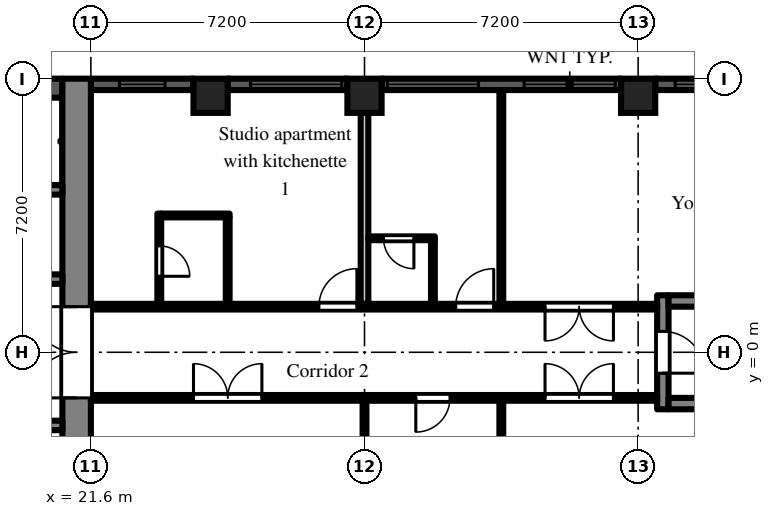
"""IFC4 building model, lengths in metres.
Left out: names, types, materials, properties, quantities, classifications, styles, units other than length and angle.
Written with IfcOpenShell. Run it as: python <this file> out.ifc"""

import sys

from ifc_helpers import new_model, si_unit, direction, frame, frame_2d, origin, origin_2d, place, context, subcontext, project, spatial, rectangle, extrude, element, fill, save


model = new_model("IFC4")
c1 = context("Model", 3, precision=1e-05, world=origin(), true_north=direction((0.0, 1.0)))
c2 = subcontext(c1, "Body", "Model", "MODEL_VIEW")
j1 = project(units=[si_unit("LENGTHUNIT", "METRE"), si_unit("PLANEANGLEUNIT", "RADIAN")], contexts=[c1])
p1 = place(None, origin())
s1 = spatial("IfcSite", under=j1, at=p1, CompositionType="ELEMENT")
p2 = place(p1, origin())
s2 = spatial("IfcBuilding", under=s1, at=p2, CompositionType="ELEMENT")
p3 = place(p2, frame((0.0, 0.0, 84.9)))
s3 = spatial("IfcBuildingStorey", under=s2, at=p3, CompositionType="ELEMENT", Elevation=84.9)
for number, where, z_axis, x_axis in (
    (1, (24.75, 6.75, 0.0), (0.0, 0.0, 1.0), (1.0, 0.0, 0.0)),
    (2, (28.8, 6.75, 0.0), (0.0, 0.0, 1.0), (1.0, 0.0, 0.0)),
    (3, (36.0, 6.75, 0.0), (0.0, 0.0, 1.0), (1.0, 0.0, 0.0)),
):
    element("IfcColumn", number, at=place(p3, frame(where, z_axis=z_axis, x_axis=x_axis)), inside=s3, PredefinedType="COLUMN", context=c2, shape_type="SweptSolid", body=[
        extrude(rectangle(XDim=0.9, YDim=0.9, at=origin_2d()), origin(), (0.0, 0.0, 1.0), 3.0),
    ])
p4 = place(p3, frame((38.7, 7.05, 0.0), z_axis=(0.0, 0.0, 1.0), x_axis=(-1.0, 0.0, 0.0)))
e4 = element("IfcWall", 4, at=p4, inside=s3, PredefinedType="SOLIDWALL", context=c2, shape_type="SweptSolid", body=[
    extrude(rectangle(XDim=2.25, YDim=0.3, at=frame_2d((1.125, 0.0))), origin(), (0.0, 0.0, 1.0), 2.1),
])
p5 = place(p4, frame((0.525, 0.0, 0.2)))
e5 = element("IfcOpeningElement", 5, at=p5, cuts=e4, PredefinedType="OPENING", context=c2, shape_type="SweptSolid", body=[
    extrude(rectangle(XDim=1.2, YDim=1.85, at=frame_2d((0.6, 0.925))), frame((0.0, 0.16, 0.0), z_axis=(0.0, -1.0, 0.0), x_axis=(1.0, 0.0, 0.0)), (0.0, 0.0, 1.0), 0.32),
])
p6 = place(p3, frame((35.55, 7.05, 0.0), z_axis=(0.0, 0.0, 1.0), x_axis=(-1.0, 0.0, 0.0)))
e6 = element("IfcWall", 6, at=p6, inside=s3, PredefinedType="SOLIDWALL", context=c2, shape_type="SweptSolid", body=[
    extrude(rectangle(XDim=6.3, YDim=0.3, at=frame_2d((3.15, 0.0))), origin(), (0.0, 0.0, 1.0), 2.1),
])
p7 = place(p6, frame((0.15, 0.0, 0.2)))
e7 = element("IfcOpeningElement", 7, at=p7, cuts=e6, PredefinedType="OPENING", context=c2, shape_type="SweptSolid", body=[
    extrude(rectangle(XDim=2.4, YDim=1.85, at=frame_2d((1.2, 0.925))), frame((0.0, 0.16, 0.0), z_axis=(0.0, -1.0, 0.0), x_axis=(1.0, 0.0, 0.0)), (0.0, 0.0, 1.0), 0.32),
])
p8 = place(p6, frame((3.75, 0.0, 0.2)))
e8 = element("IfcOpeningElement", 8, at=p8, cuts=e6, PredefinedType="OPENING", context=c2, shape_type="SweptSolid", body=[
    extrude(rectangle(XDim=2.4, YDim=1.85, at=frame_2d((1.2, 0.925))), frame((0.0, 0.16, 0.0), z_axis=(0.0, -1.0, 0.0), x_axis=(1.0, 0.0, 0.0)), (0.0, 0.0, 1.0), 0.32),
])
p9 = place(p3, frame((28.35, 7.05, 0.0), z_axis=(0.0, 0.0, 1.0), x_axis=(-1.0, 0.0, 0.0)))
e9 = element("IfcWall", 9, at=p9, inside=s3, PredefinedType="SOLIDWALL", context=c2, shape_type="SweptSolid", body=[
    extrude(rectangle(XDim=3.15, YDim=0.3, at=frame_2d((1.575, 0.0))), origin(), (0.0, 0.0, 1.0), 2.1),
])
p10 = place(p9, frame((0.15, 0.0, 0.2)))
e10 = element("IfcOpeningElement", 10, at=p10, cuts=e9, PredefinedType="OPENING", context=c2, shape_type="SweptSolid", body=[
    extrude(rectangle(XDim=2.4, YDim=1.85, at=frame_2d((1.2, 0.925))), frame((0.0, 0.16, 0.0), z_axis=(0.0, -1.0, 0.0), x_axis=(1.0, 0.0, 0.0)), (0.0, 0.0, 1.0), 0.32),
])
p11 = place(p3, frame((24.3, 7.05, 0.0), z_axis=(0.0, 0.0, 1.0), x_axis=(-1.0, 0.0, 0.0)))
e11 = element("IfcWall", 11, at=p11, inside=s3, PredefinedType="SOLIDWALL", context=c2, shape_type="SweptSolid", body=[
    extrude(rectangle(XDim=2.7, YDim=0.3, at=frame_2d((1.35, 0.0))), origin(), (0.0, 0.0, 1.0), 2.1),
])
p12 = place(p11, frame((0.75, 0.0, 0.2)))
e12 = element("IfcOpeningElement", 12, at=p12, cuts=e11, PredefinedType="OPENING", context=c2, shape_type="SweptSolid", body=[
    extrude(rectangle(XDim=1.2, YDim=1.85, at=frame_2d((0.6, 0.925))), frame((0.0, 0.16, 0.0), z_axis=(0.0, -1.0, 0.0), x_axis=(1.0, 0.0, 0.0)), (0.0, 0.0, 1.0), 0.32),
])
p13 = place(p3, frame((21.225, -7.2, 0.0), z_axis=(0.0, 0.0, 1.0), x_axis=(0.0, 1.0, 0.0)))
e13 = element("IfcWall", 13, at=p13, inside=s3, PredefinedType="SHEAR", context=c2, shape_type="SweptSolid", body=[
    extrude(rectangle(XDim=14.4, YDim=0.75, at=frame_2d((7.2, 0.0))), origin(), (0.0, 0.0, 1.0), 2.575),
])
p14 = place(p13, frame((6.0, 0.0, 0.0)))
e14 = element("IfcOpeningElement", 14, at=p14, cuts=e13, PredefinedType="OPENING", context=c2, shape_type="SweptSolid", body=[
    extrude(rectangle(XDim=2.4, YDim=2.2, at=frame_2d((1.2, 1.1))), frame((0.0, 0.385, 0.0), z_axis=(0.0, -1.0, 0.0), x_axis=(1.0, 0.0, 0.0)), (0.0, 0.0, 1.0), 0.77),
])
p15 = place(p3, frame((7.9, 6.95, 0.0), z_axis=(0.0, 0.0, 1.0), x_axis=(1.0, 0.0, 0.0)))
e15 = element("IfcWall", 15, at=p15, inside=s3, PredefinedType="SHEAR", context=c2, shape_type="SweptSolid", body=[
    extrude(rectangle(XDim=12.95, YDim=0.5, at=frame_2d((6.475, 0.0))), origin(), (0.0, 0.0, 1.0), 2.575),
])
p16 = place(p3, frame((7.9, 1.925, 0.0), z_axis=(0.0, 0.0, 1.0), x_axis=(1.0, 0.0, 0.0)))
e16 = element("IfcWall", 16, at=p16, inside=s3, PredefinedType="SHEAR", context=c2, shape_type="SweptSolid", body=[
    extrude(rectangle(XDim=12.95, YDim=0.25, at=frame_2d((6.475, 0.0))), origin(), (0.0, 0.0, 1.0), 2.575),
])
p17 = place(p16, frame((0.525, 0.0, 0.0)))
e17 = element("IfcOpeningElement", 17, at=p17, cuts=e16, PredefinedType="OPENING", context=c2, shape_type="SweptSolid", body=[
    extrude(rectangle(XDim=0.9, YDim=2.1, at=frame_2d((0.45, 1.05))), frame((0.0, 0.135, 0.0), z_axis=(0.0, -1.0, 0.0), x_axis=(1.0, 0.0, 0.0)), (0.0, 0.0, 1.0), 0.27),
])
p18 = place(p16, frame((2.625, 0.0, 0.0)))
e18 = element("IfcOpeningElement", 18, at=p18, cuts=e16, PredefinedType="OPENING", context=c2, shape_type="SweptSolid", body=[
    extrude(rectangle(XDim=1.1, YDim=2.1, at=frame_2d((0.55, 1.05))), frame((0.0, 0.135, 0.0), z_axis=(0.0, -1.0, 0.0), x_axis=(1.0, 0.0, 0.0)), (0.0, 0.0, 1.0), 0.27),
])
p19 = place(p16, frame((6.025, 0.0, 0.0)))
e19 = element("IfcOpeningElement", 19, at=p19, cuts=e16, PredefinedType="OPENING", context=c2, shape_type="SweptSolid", body=[
    extrude(rectangle(XDim=0.9, YDim=2.1, at=frame_2d((0.45, 1.05))), frame((0.0, 0.135, 0.0), z_axis=(0.0, -1.0, 0.0), x_axis=(1.0, 0.0, 0.0)), (0.0, 0.0, 1.0), 0.27),
])
p20 = place(p16, frame((9.325, 0.0, 0.0)))
e20 = element("IfcOpeningElement", 20, at=p20, cuts=e16, PredefinedType="OPENING", context=c2, shape_type="SweptSolid", body=[
    extrude(rectangle(XDim=0.9, YDim=2.1, at=frame_2d((0.45, 1.05))), frame((0.0, 0.135, 0.0), z_axis=(0.0, -1.0, 0.0), x_axis=(1.0, 0.0, 0.0)), (0.0, 0.0, 1.0), 0.27),
])
p21 = place(p3, frame((12.3, 4.275, 0.0), z_axis=(0.0, 0.0, 1.0), x_axis=(1.0, 0.0, 0.0)))
e21 = element("IfcWall", 21, at=p21, inside=s3, PredefinedType="SHEAR", context=c2, shape_type="SweptSolid", body=[
    extrude(rectangle(XDim=8.55, YDim=0.25, at=frame_2d((4.275, 0.0))), origin(), (0.0, 0.0, 1.0), 2.575),
])
p22 = place(p3, frame((7.9, -1.925, 0.0), z_axis=(0.0, 0.0, 1.0), x_axis=(1.0, 0.0, 0.0)))
e22 = element("IfcWall", 22, at=p22, inside=s3, PredefinedType="SHEAR", context=c2, shape_type="SweptSolid", body=[
    extrude(rectangle(XDim=12.95, YDim=0.25, at=frame_2d((6.475, 0.0))), origin(), (0.0, 0.0, 1.0), 2.575),
])
p23 = place(p22, frame((4.825, 0.0, 0.0)))
e23 = element("IfcOpeningElement", 23, at=p23, cuts=e22, PredefinedType="OPENING", context=c2, shape_type="SweptSolid", body=[
    extrude(rectangle(XDim=1.1, YDim=2.1, at=frame_2d((0.55, 1.05))), frame((0.0, 0.135, 0.0), z_axis=(0.0, -1.0, 0.0), x_axis=(1.0, 0.0, 0.0)), (0.0, 0.0, 1.0), 0.27),
])
p24 = place(p22, frame((7.025, 0.0, 0.0)))
e24 = element("IfcOpeningElement", 24, at=p24, cuts=e22, PredefinedType="OPENING", context=c2, shape_type="SweptSolid", body=[
    extrude(rectangle(XDim=1.1, YDim=2.1, at=frame_2d((0.55, 1.05))), frame((0.0, 0.135, 0.0), z_axis=(0.0, -1.0, 0.0), x_axis=(1.0, 0.0, 0.0)), (0.0, 0.0, 1.0), 0.27),
])
p25 = place(p22, frame((9.225, 0.0, 0.0)))
e25 = element("IfcOpeningElement", 25, at=p25, cuts=e22, PredefinedType="OPENING", context=c2, shape_type="SweptSolid", body=[
    extrude(rectangle(XDim=1.1, YDim=2.1, at=frame_2d((0.55, 1.05))), frame((0.0, 0.135, 0.0), z_axis=(0.0, -1.0, 0.0), x_axis=(1.0, 0.0, 0.0)), (0.0, 0.0, 1.0), 0.27),
])
p26 = place(p22, frame((0.525, 0.0, 0.0)))
e26 = element("IfcOpeningElement", 26, at=p26, cuts=e22, PredefinedType="OPENING", context=c2, shape_type="SweptSolid", body=[
    extrude(rectangle(XDim=0.9, YDim=2.1, at=frame_2d((0.45, 1.05))), frame((0.0, 0.135, 0.0), z_axis=(0.0, -1.0, 0.0), x_axis=(1.0, 0.0, 0.0)), (0.0, 0.0, 1.0), 0.27),
])
p27 = place(p22, frame((2.625, 0.0, 0.0)))
e27 = element("IfcOpeningElement", 27, at=p27, cuts=e22, PredefinedType="OPENING", context=c2, shape_type="SweptSolid", body=[
    extrude(rectangle(XDim=1.1, YDim=2.1, at=frame_2d((0.55, 1.05))), frame((0.0, 0.135, 0.0), z_axis=(0.0, -1.0, 0.0), x_axis=(1.0, 0.0, 0.0)), (0.0, 0.0, 1.0), 0.27),
])
p28 = place(p3, frame((36.65, -1.5, 0.0), z_axis=(0.0, 0.0, 1.0), x_axis=(0.0, 1.0, 0.0)))
e28 = element("IfcWall", 28, at=p28, inside=s3, PredefinedType="SHEAR", context=c2, shape_type="SweptSolid", body=[
    extrude(rectangle(XDim=3.0, YDim=0.3, at=frame_2d((1.5, 0.0))), origin(), (0.0, 0.0, 1.0), 2.575),
])
p29 = place(p28, frame((0.95, 0.0, 0.0)))
e29 = element("IfcOpeningElement", 29, at=p29, cuts=e28, PredefinedType="OPENING", context=c2, shape_type="SweptSolid", body=[
    extrude(rectangle(XDim=1.1, YDim=2.1, at=frame_2d((0.55, 1.05))), frame((0.0, 0.16, 0.0), z_axis=(0.0, -1.0, 0.0), x_axis=(1.0, 0.0, 0.0)), (0.0, 0.0, 1.0), 0.32),
])
for number, where, z_axis, x_axis in (
    (30, (36.8, -1.35, 0.0), (0.0, 0.0, 1.0), (1.0, 0.0, 0.0)),
    (31, (36.8, 1.35, 0.0), (0.0, 0.0, 1.0), (1.0, 0.0, 0.0)),
):
    element("IfcWall", number, at=place(p3, frame(where, z_axis=z_axis, x_axis=x_axis)), inside=s3, PredefinedType="SHEAR", context=c2, shape_type="SweptSolid", body=[
        extrude(rectangle(XDim=5.8, YDim=0.3, at=frame_2d((2.9, 0.0))), origin(), (0.0, 0.0, 1.0), 2.575),
    ])
p30 = place(p3, frame((21.6, -1.2, 0.0), z_axis=(0.0, 0.0, 1.0), x_axis=(1.0, 0.0, 0.0)))
e32 = element("IfcWall", 32, at=p30, inside=s3, PredefinedType="PARTITIONING", context=c2, shape_type="SweptSolid", body=[
    extrude(rectangle(XDim=14.9, YDim=0.15, at=frame_2d((7.45, 0.0))), origin(), (0.0, 0.0, 1.0), 2.575),
])
p31 = place(p30, frame((2.7, 0.0, 0.0)))
e33 = element("IfcOpeningElement", 33, at=p31, cuts=e32, PredefinedType="OPENING", context=c2, shape_type="SweptSolid", body=[
    extrude(rectangle(XDim=1.8, YDim=2.1, at=frame_2d((0.9, 1.05))), frame((0.0, 0.085, 0.0), z_axis=(0.0, -1.0, 0.0), x_axis=(1.0, 0.0, 0.0)), (0.0, 0.0, 1.0), 0.17),
])
p32 = place(p30, frame((8.55, 0.0, 0.0)))
e34 = element("IfcOpeningElement", 34, at=p32, cuts=e32, PredefinedType="OPENING", context=c2, shape_type="SweptSolid", body=[
    extrude(rectangle(XDim=0.9, YDim=2.1, at=frame_2d((0.45, 1.05))), frame((0.0, 0.085, 0.0), z_axis=(0.0, -1.0, 0.0), x_axis=(1.0, 0.0, 0.0)), (0.0, 0.0, 1.0), 0.17),
])
p33 = place(p30, frame((11.95, 0.0, 0.0)))
e35 = element("IfcOpeningElement", 35, at=p33, cuts=e32, PredefinedType="OPENING", context=c2, shape_type="SweptSolid", body=[
    extrude(rectangle(XDim=1.8, YDim=2.1, at=frame_2d((0.9, 1.05))), frame((0.0, 0.085, 0.0), z_axis=(0.0, -1.0, 0.0), x_axis=(1.0, 0.0, 0.0)), (0.0, 0.0, 1.0), 0.17),
])
p34 = place(p3, frame((21.6, 1.2, 0.0), z_axis=(0.0, 0.0, 1.0), x_axis=(1.0, 0.0, 0.0)))
e36 = element("IfcWall", 36, at=p34, inside=s3, PredefinedType="PARTITIONING", context=c2, shape_type="SweptSolid", body=[
    extrude(rectangle(XDim=14.9, YDim=0.15, at=frame_2d((7.45, 0.0))), origin(), (0.0, 0.0, 1.0), 2.575),
])
p35 = place(p34, frame((6.0, 0.0, 0.0)))
e37 = element("IfcOpeningElement", 37, at=p35, cuts=e36, PredefinedType="OPENING", context=c2, shape_type="SweptSolid", body=[
    extrude(rectangle(XDim=1.0, YDim=2.1, at=frame_2d((0.5, 1.05))), frame((0.0, 0.085, 0.0), z_axis=(0.0, -1.0, 0.0), x_axis=(1.0, 0.0, 0.0)), (0.0, 0.0, 1.0), 0.17),
])
p36 = place(p34, frame((9.6, 0.0, 0.0)))
e38 = element("IfcOpeningElement", 38, at=p36, cuts=e36, PredefinedType="OPENING", context=c2, shape_type="SweptSolid", body=[
    extrude(rectangle(XDim=1.0, YDim=2.1, at=frame_2d((0.5, 1.05))), frame((0.0, 0.085, 0.0), z_axis=(0.0, -1.0, 0.0), x_axis=(1.0, 0.0, 0.0)), (0.0, 0.0, 1.0), 0.17),
])
p37 = place(p34, frame((11.95, 0.0, 0.0)))
e39 = element("IfcOpeningElement", 39, at=p37, cuts=e36, PredefinedType="OPENING", context=c2, shape_type="SweptSolid", body=[
    extrude(rectangle(XDim=1.8, YDim=2.1, at=frame_2d((0.9, 1.05))), frame((0.0, 0.085, 0.0), z_axis=(0.0, -1.0, 0.0), x_axis=(1.0, 0.0, 0.0)), (0.0, 0.0, 1.0), 0.17),
])
p38 = place(p3, frame((23.4, 1.275, 0.0), z_axis=(0.0, 0.0, 1.0), x_axis=(0.0, 1.0, 0.0)))
e40 = element("IfcWall", 40, at=p38, inside=s3, PredefinedType="PARTITIONING", context=c2, shape_type="SweptSolid", body=[
    extrude(rectangle(XDim=2.375, YDim=0.1, at=frame_2d((1.188, 0.0))), origin(), (0.0, 0.0, 1.0), 2.575),
])
p39 = place(p38, frame((0.725, 0.0, 0.0)))
e41 = element("IfcOpeningElement", 41, at=p39, cuts=e40, PredefinedType="OPENING", context=c2, shape_type="SweptSolid", body=[
    extrude(rectangle(XDim=0.8, YDim=2.1, at=frame_2d((0.4, 1.05))), frame((0.0, 0.06, 0.0), z_axis=(0.0, -1.0, 0.0), x_axis=(1.0, 0.0, 0.0)), (0.0, 0.0, 1.0), 0.12),
])
p40 = place(p3, frame((23.45, 3.6, 0.0), z_axis=(0.0, 0.0, 1.0), x_axis=(1.0, 0.0, 0.0)))
e42 = element("IfcWall", 42, at=p40, inside=s3, PredefinedType="PARTITIONING", context=c2, shape_type="SweptSolid", body=[
    extrude(rectangle(XDim=1.8, YDim=0.1, at=frame_2d((0.9, 0.0))), origin(), (0.0, 0.0, 1.0), 2.575),
])
p41 = place(p3, frame((25.2, 1.275, 0.0), z_axis=(0.0, 0.0, 1.0), x_axis=(0.0, 1.0, 0.0)))
e43 = element("IfcWall", 43, at=p41, inside=s3, PredefinedType="PARTITIONING", context=c2, shape_type="SweptSolid", body=[
    extrude(rectangle(XDim=2.275, YDim=0.1, at=frame_2d((1.138, 0.0))), origin(), (0.0, 0.0, 1.0), 2.575),
])
p42 = place(p3, frame((28.8, -6.9, 0.0), z_axis=(0.0, 0.0, 1.0), x_axis=(0.0, 1.0, 0.0)))
e44 = element("IfcWall", 44, at=p42, inside=s3, PredefinedType="PARTITIONING", context=c2, shape_type="SweptSolid", body=[
    extrude(rectangle(XDim=5.625, YDim=0.1, at=frame_2d((2.812, 0.0))), origin(), (0.0, 0.0, 1.0), 2.575),
])
p43 = place(p3, frame((28.8, 1.275, 0.0), z_axis=(0.0, 0.0, 1.0), x_axis=(0.0, 1.0, 0.0)))
e45 = element("IfcWall", 45, at=p43, inside=s3, PredefinedType="PARTITIONING", context=c2, shape_type="SweptSolid", body=[
    extrude(rectangle(XDim=5.625, YDim=0.2, at=frame_2d((2.812, 0.0))), origin(), (0.0, 0.0, 1.0), 2.575),
])
p44 = place(p3, frame((28.9, 3.0, 0.0), z_axis=(0.0, 0.0, 1.0), x_axis=(1.0, 0.0, 0.0)))
e46 = element("IfcWall", 46, at=p44, inside=s3, PredefinedType="PARTITIONING", context=c2, shape_type="SweptSolid", body=[
    extrude(rectangle(XDim=1.75, YDim=0.1, at=frame_2d((0.875, 0.0))), origin(), (0.0, 0.0, 1.0), 2.575),
])
p45 = place(p44, frame((0.4, 0.0, 0.0)))
e47 = element("IfcOpeningElement", 47, at=p45, cuts=e46, PredefinedType="OPENING", context=c2, shape_type="SweptSolid", body=[
    extrude(rectangle(XDim=0.8, YDim=2.1, at=frame_2d((0.4, 1.05))), frame((0.0, 0.06, 0.0), z_axis=(0.0, -1.0, 0.0), x_axis=(1.0, 0.0, 0.0)), (0.0, 0.0, 1.0), 0.12),
])
p46 = place(p3, frame((30.6, 1.275, 0.0), z_axis=(0.0, 0.0, 1.0), x_axis=(0.0, 1.0, 0.0)))
e48 = element("IfcWall", 48, at=p46, inside=s3, PredefinedType="PARTITIONING", context=c2, shape_type="SweptSolid", body=[
    extrude(rectangle(XDim=1.675, YDim=0.1, at=frame_2d((0.837, 0.0))), origin(), (0.0, 0.0, 1.0), 2.575),
])
for number, where, z_axis, x_axis in (
    (49, (32.4, -6.9, 0.0), (0.0, 0.0, 1.0), (0.0, 1.0, 0.0)),
    (50, (32.4, 1.275, 0.0), (0.0, 0.0, 1.0), (0.0, 1.0, 0.0)),
):
    element("IfcWall", number, at=place(p3, frame(where, z_axis=z_axis, x_axis=x_axis)), inside=s3, PredefinedType="PARTITIONING", context=c2, shape_type="SweptSolid", body=[
        extrude(rectangle(XDim=5.625, YDim=0.1, at=frame_2d((2.812, 0.0))), origin(), (0.0, 0.0, 1.0), 2.575),
    ])
p47 = place(p5, origin())
e51 = element("IfcWindow", 51, at=p47, inside=s3, PartitioningType="SINGLE_PANEL", PredefinedType="WINDOW", context=c2, shape_type="SweptSolid", body=[
    extrude(rectangle(XDim=1.2, YDim=1.85, at=frame_2d((0.6, 0.925))), frame((0.0, 0.03, 0.0), z_axis=(0.0, -1.0, 0.0), x_axis=(1.0, 0.0, 0.0)), (0.0, 0.0, 1.0), 0.06),
])
fill(e5, e51)
p48 = place(p7, origin())
e52 = element("IfcWindow", 52, at=p48, inside=s3, PartitioningType="SINGLE_PANEL", PredefinedType="WINDOW", context=c2, shape_type="SweptSolid", body=[
    extrude(rectangle(XDim=2.4, YDim=1.85, at=frame_2d((1.2, 0.925))), frame((0.0, 0.03, 0.0), z_axis=(0.0, -1.0, 0.0), x_axis=(1.0, 0.0, 0.0)), (0.0, 0.0, 1.0), 0.06),
])
fill(e7, e52)
p49 = place(p8, origin())
e53 = element("IfcWindow", 53, at=p49, inside=s3, PartitioningType="SINGLE_PANEL", PredefinedType="WINDOW", context=c2, shape_type="SweptSolid", body=[
    extrude(rectangle(XDim=2.4, YDim=1.85, at=frame_2d((1.2, 0.925))), frame((0.0, 0.03, 0.0), z_axis=(0.0, -1.0, 0.0), x_axis=(1.0, 0.0, 0.0)), (0.0, 0.0, 1.0), 0.06),
])
fill(e8, e53)
p50 = place(p10, origin())
e54 = element("IfcWindow", 54, at=p50, inside=s3, PartitioningType="SINGLE_PANEL", PredefinedType="WINDOW", context=c2, shape_type="SweptSolid", body=[
    extrude(rectangle(XDim=2.4, YDim=1.85, at=frame_2d((1.2, 0.925))), frame((0.0, 0.03, 0.0), z_axis=(0.0, -1.0, 0.0), x_axis=(1.0, 0.0, 0.0)), (0.0, 0.0, 1.0), 0.06),
])
fill(e10, e54)
p51 = place(p12, origin())
e55 = element("IfcWindow", 55, at=p51, inside=s3, PartitioningType="SINGLE_PANEL", PredefinedType="WINDOW", context=c2, shape_type="SweptSolid", body=[
    extrude(rectangle(XDim=1.2, YDim=1.85, at=frame_2d((0.6, 0.925))), frame((0.0, 0.03, 0.0), z_axis=(0.0, -1.0, 0.0), x_axis=(1.0, 0.0, 0.0)), (0.0, 0.0, 1.0), 0.06),
])
fill(e12, e55)
p52 = place(p14, origin())
e56 = element("IfcDoor", 56, at=p52, inside=s3, OperationType="DOUBLE_DOOR_DOUBLE_SWING", PredefinedType="DOOR", context=c2, shape_type="SweptSolid", body=[
    extrude(rectangle(XDim=2.4, YDim=2.2, at=frame_2d((1.2, 1.1))), frame((0.0, 0.025, 0.0), z_axis=(0.0, -1.0, 0.0), x_axis=(1.0, 0.0, 0.0)), (0.0, 0.0, 1.0), 0.05),
])
fill(e14, e56)
p53 = place(p29, frame((1.1, 0.0, 0.0), z_axis=(0.0, 0.0, 1.0), x_axis=(-1.0, 0.0, 0.0)))
e57 = element("IfcDoor", 57, at=p53, inside=s3, OperationType="SINGLE_SWING_RIGHT", PredefinedType="DOOR", context=c2, shape_type="SweptSolid", body=[
    extrude(rectangle(XDim=1.1, YDim=2.1, at=frame_2d((0.55, 1.05))), frame((0.0, 0.025, 0.0), z_axis=(0.0, -1.0, 0.0), x_axis=(1.0, 0.0, 0.0)), (0.0, 0.0, 1.0), 0.05),
])
fill(e29, e57)
p54 = place(p39, frame((0.8, 0.0, 0.0), z_axis=(0.0, 0.0, 1.0), x_axis=(-1.0, 0.0, 0.0)))
e58 = element("IfcDoor", 58, at=p54, inside=s3, OperationType="SINGLE_SWING_RIGHT", PredefinedType="DOOR", context=c2, shape_type="SweptSolid", body=[
    extrude(rectangle(XDim=0.8, YDim=2.1, at=frame_2d((0.4, 1.05))), frame((0.0, 0.025, 0.0), z_axis=(0.0, -1.0, 0.0), x_axis=(1.0, 0.0, 0.0)), (0.0, 0.0, 1.0), 0.05),
])
fill(e41, e58)
p55 = place(p35, origin())
e59 = element("IfcDoor", 59, at=p55, inside=s3, OperationType="SINGLE_SWING_RIGHT", PredefinedType="DOOR", context=c2, shape_type="SweptSolid", body=[
    extrude(rectangle(XDim=1.0, YDim=2.1, at=frame_2d((0.5, 1.05))), frame((0.0, 0.025, 0.0), z_axis=(0.0, -1.0, 0.0), x_axis=(1.0, 0.0, 0.0)), (0.0, 0.0, 1.0), 0.05),
])
fill(e37, e59)
p56 = place(p45, frame((0.8, 0.0, 0.0), z_axis=(0.0, 0.0, 1.0), x_axis=(-1.0, 0.0, 0.0)))
e60 = element("IfcDoor", 60, at=p56, inside=s3, OperationType="SINGLE_SWING_LEFT", PredefinedType="DOOR", context=c2, shape_type="SweptSolid", body=[
    extrude(rectangle(XDim=0.8, YDim=2.1, at=frame_2d((0.4, 1.05))), frame((0.0, 0.025, 0.0), z_axis=(0.0, -1.0, 0.0), x_axis=(1.0, 0.0, 0.0)), (0.0, 0.0, 1.0), 0.05),
])
fill(e47, e60)
p57 = place(p36, origin())
e61 = element("IfcDoor", 61, at=p57, inside=s3, OperationType="SINGLE_SWING_RIGHT", PredefinedType="DOOR", context=c2, shape_type="SweptSolid", body=[
    extrude(rectangle(XDim=1.0, YDim=2.1, at=frame_2d((0.5, 1.05))), frame((0.0, 0.025, 0.0), z_axis=(0.0, -1.0, 0.0), x_axis=(1.0, 0.0, 0.0)), (0.0, 0.0, 1.0), 0.05),
])
fill(e38, e61)
p58 = place(p37, frame((1.8, 0.0, 0.0), z_axis=(0.0, 0.0, 1.0), x_axis=(-1.0, 0.0, 0.0)))
e62 = element("IfcDoor", 62, at=p58, inside=s3, OperationType="DOUBLE_DOOR_DOUBLE_SWING", PredefinedType="DOOR", context=c2, shape_type="SweptSolid", body=[
    extrude(rectangle(XDim=1.8, YDim=2.1, at=frame_2d((0.9, 1.05))), frame((0.0, 0.025, 0.0), z_axis=(0.0, -1.0, 0.0), x_axis=(1.0, 0.0, 0.0)), (0.0, 0.0, 1.0), 0.05),
])
fill(e39, e62)
p59 = place(p31, origin())
e63 = element("IfcDoor", 63, at=p59, inside=s3, OperationType="DOUBLE_DOOR_DOUBLE_SWING", PredefinedType="DOOR", context=c2, shape_type="SweptSolid", body=[
    extrude(rectangle(XDim=1.8, YDim=2.1, at=frame_2d((0.9, 1.05))), frame((0.0, 0.025, 0.0), z_axis=(0.0, -1.0, 0.0), x_axis=(1.0, 0.0, 0.0)), (0.0, 0.0, 1.0), 0.05),
])
fill(e33, e63)
p60 = place(p32, frame((0.9, 0.0, 0.0), z_axis=(0.0, 0.0, 1.0), x_axis=(-1.0, 0.0, 0.0)))
e64 = element("IfcDoor", 64, at=p60, inside=s3, OperationType="SINGLE_SWING_RIGHT", PredefinedType="DOOR", context=c2, shape_type="SweptSolid", body=[
    extrude(rectangle(XDim=0.9, YDim=2.1, at=frame_2d((0.45, 1.05))), frame((0.0, 0.025, 0.0), z_axis=(0.0, -1.0, 0.0), x_axis=(1.0, 0.0, 0.0)), (0.0, 0.0, 1.0), 0.05),
])
fill(e34, e64)
p61 = place(p33, origin())
e65 = element("IfcDoor", 65, at=p61, inside=s3, OperationType="DOUBLE_DOOR_DOUBLE_SWING", PredefinedType="DOOR", context=c2, shape_type="SweptSolid", body=[
    extrude(rectangle(XDim=1.8, YDim=2.1, at=frame_2d((0.9, 1.05))), frame((0.0, 0.025, 0.0), z_axis=(0.0, -1.0, 0.0), x_axis=(1.0, 0.0, 0.0)), (0.0, 0.0, 1.0), 0.05),
])
fill(e35, e65)
save(model, sys.argv[1])
